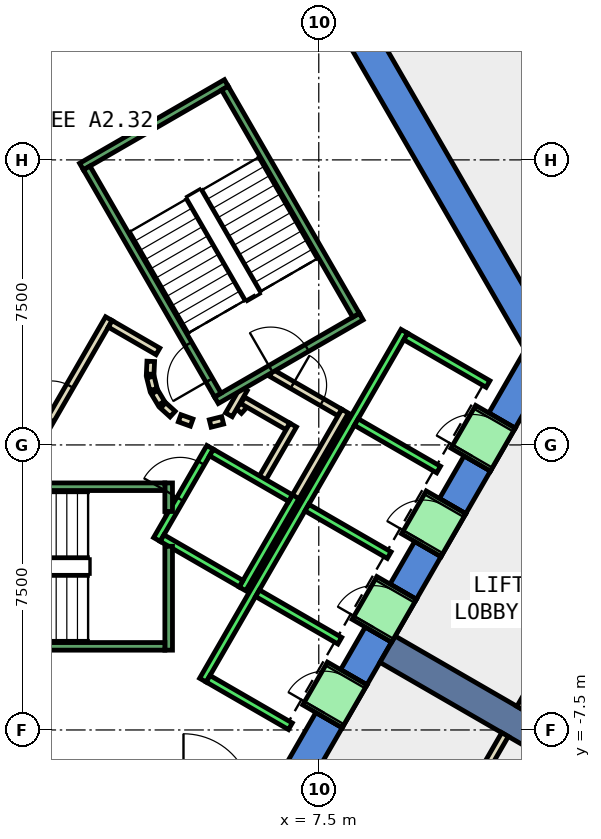
"""IFC4 building model, lengths in metres.
Left out: names, types, materials, properties, quantities, classifications, styles, units other than length and angle.
Written with IfcOpenShell. Run it as: python <this file> out.ifc"""

import sys

from ifc_helpers import new_model, si_unit, direction, frame, frame_2d, origin, place, context, subcontext, project, spatial, polyline, rectangle, outline, extrude, element, fill, save


model = new_model("IFC4")
c1 = context("Model", 3, precision=1e-05, world=origin(), true_north=direction((0.0, 1.0)))
c2 = subcontext(c1, "Body", "Model", "MODEL_VIEW")
j1 = project(units=[si_unit("LENGTHUNIT", "METRE"), si_unit("PLANEANGLEUNIT", "RADIAN")], contexts=[c1])
p1 = place(None, origin())
s1 = spatial("IfcSite", under=j1, at=p1, CompositionType="ELEMENT")
p2 = place(p1, origin())
s2 = spatial("IfcBuilding", under=s1, at=p2, CompositionType="ELEMENT")
p3 = place(p2, frame((0.0, 0.0, 159.2)))
s3 = spatial("IfcBuildingStorey", under=s2, at=p3, CompositionType="ELEMENT", Elevation=159.2)
p4 = place(p3, frame((0.0, 0.0, -0.4)))
e1 = element("IfcWall", 1, at=p4, inside=s3, PredefinedType="SHEAR", context=c2, shape_type="SweptSolid", body=[
    extrude(outline(polyline([(8.517, 11.748), (7.824, 11.348), (12.933, 2.5), (13.856, 2.5), (8.517, 11.748)])), origin(), (0.0, 0.0, 1.0), 4.2),
])
p5 = place(p3, frame((0.0, 0.0, -0.4)))
e2 = element("IfcWall", 2, at=p5, inside=s3, PredefinedType="SHEAR", context=c2, shape_type="SweptSolid", body=[
    extrude(outline(polyline([(8.117, -7.44), (7.424, -7.04), (6.466, -8.7), (6.928, -9.5), (8.117, -7.44)])), origin(), (0.0, 0.0, 1.0), 4.2),
])
p6 = place(p3, frame((0.0, 0.0, -0.4)))
e3 = element("IfcWall", 3, at=p6, inside=s3, PredefinedType="SHEAR", context=c2, shape_type="SweptSolid", body=[
    extrude(outline(polyline([(9.417, -5.189), (8.724, -4.789), (8.075, -5.914), (8.767, -6.314), (9.417, -5.189)])), origin(), (0.0, 0.0, 1.0), 4.2),
])
p7 = place(p3, frame((0.0, 0.0, -0.4)))
e4 = element("IfcWall", 4, at=p7, inside=s3, PredefinedType="SHEAR", context=c2, shape_type="SweptSolid", body=[
    extrude(outline(polyline([(10.717, -2.937), (10.025, -2.537), (9.374, -3.663), (10.067, -4.063), (10.717, -2.937)])), origin(), (0.0, 0.0, 1.0), 4.2),
])
p8 = place(p3, frame((0.0, 0.0, -0.4)))
e5 = element("IfcWall", 5, at=p8, inside=s3, PredefinedType="SHEAR", context=c2, shape_type="SweptSolid", body=[
    extrude(outline(polyline([(12.017, -0.686), (11.324, -0.286), (10.675, -1.411), (11.367, -1.811), (12.017, -0.686)])), origin(), (0.0, 0.0, 1.0), 4.2),
])
p9 = place(p3, frame((0.0, 0.0, -0.4)))
e6 = element("IfcWall", 6, at=p9, inside=s3, PredefinedType="SHEAR", context=c2, shape_type="SweptSolid", body=[
    extrude(outline(polyline([(11.974, 0.84), (12.667, 0.44), (13.856, 2.5), (12.933, 2.5), (11.974, 0.84)])), origin(), (0.0, 0.0, 1.0), 4.2),
])
p10 = place(p3, frame((0.0, 0.0, 3.6)))
e7 = element("IfcWall", 7, at=p10, inside=s3, PredefinedType="SHEAR", context=c2, shape_type="SweptSolid", body=[
    extrude(outline(polyline([(8.767, -6.314), (8.075, -5.914), (7.424, -7.04), (8.117, -7.44), (8.767, -6.314)])), origin(), (0.0, 0.0, 1.0), 0.2),
])
p11 = place(p3, frame((0.0, 0.0, 3.6)))
e8 = element("IfcWall", 8, at=p11, inside=s3, PredefinedType="SHEAR", context=c2, shape_type="SweptSolid", body=[
    extrude(outline(polyline([(10.067, -4.063), (9.374, -3.663), (8.724, -4.789), (9.417, -5.189), (10.067, -4.063)])), origin(), (0.0, 0.0, 1.0), 0.2),
])
p12 = place(p3, frame((0.0, 0.0, 3.6)))
e9 = element("IfcWall", 9, at=p12, inside=s3, PredefinedType="SHEAR", context=c2, shape_type="SweptSolid", body=[
    extrude(outline(polyline([(11.367, -1.811), (10.675, -1.411), (10.025, -2.537), (10.717, -2.937), (11.367, -1.811)])), origin(), (0.0, 0.0, 1.0), 0.2),
])
p13 = place(p3, frame((0.0, 0.0, 3.6)))
e10 = element("IfcWall", 10, at=p13, inside=s3, PredefinedType="SHEAR", context=c2, shape_type="SweptSolid", body=[
    extrude(outline(polyline([(12.667, 0.44), (11.974, 0.84), (11.324, -0.286), (12.017, -0.686), (12.667, 0.44)])), origin(), (0.0, 0.0, 1.0), 0.2),
])
p14 = place(p3, frame((9.31, -5.375, -0.4), z_axis=(0.0, 0.0, 1.0), x_axis=(0.866017533419, -0.500013631625, 0.0)))
e11 = element("IfcWall", 11, at=p14, inside=s3, PredefinedType="SHEAR", context=c2, shape_type="SweptSolid", body=[
    extrude(rectangle(XDim=9.0, YDim=0.8, at=frame_2d((4.5, 0.0))), origin(), (0.0, 0.0, 1.0), 4.2),
])
p15 = place(p3, frame((5.39, 0.898, 0.0), z_axis=(0.0, 0.0, 1.0), x_axis=(0.673828488714, 0.738887791073, 0.0)))
e12 = element("IfcWall", 12, at=p15, inside=s3, PredefinedType="PARTITIONING", context=c2, shape_type="SweptSolid", body=[
    extrude(rectangle(XDim=0.263, YDim=0.2, at=frame_2d((0.131, 0.0))), origin(), (0.0, 0.0, 1.0), 3.8),
])
p16 = place(p3, frame((5.499, 1.172, 0.0), z_axis=(0.0, 0.0, 1.0), x_axis=(0.866333505267, -0.499465972466, 0.0)))
e13 = element("IfcWall", 13, at=p16, inside=s3, PredefinedType="PARTITIONING", context=c2, shape_type="SweptSolid", body=[
    extrude(rectangle(XDim=1.374, YDim=0.2, at=frame_2d((0.687, 0.0))), origin(), (0.0, 0.0, 1.0), 3.8),
])
p17 = place(p3, frame((6.826, 0.522, 0.0), z_axis=(0.0, 0.0, 1.0), x_axis=(-0.500016722714, -0.866015748706, 0.0)))
e14 = element("IfcWall", 14, at=p17, inside=s3, PredefinedType="PARTITIONING", context=c2, shape_type="SweptSolid", body=[
    extrude(rectangle(XDim=1.7, YDim=0.2, at=frame_2d((0.85, 0.0))), origin(), (0.0, 0.0, 1.0), 3.8),
])
p18 = place(p3, frame((6.25, 1.894, 0.0), z_axis=(0.0, 0.0, 1.0), x_axis=(0.866043184279, -0.499969202016, 0.0)))
e15 = element("IfcWall", 15, at=p18, inside=s3, PredefinedType="PARTITIONING", context=c2, shape_type="SweptSolid", body=[
    extrude(rectangle(XDim=2.084, YDim=0.2, at=frame_2d((1.042, 0.0))), origin(), (0.0, 0.0, 1.0), 3.8),
])
p19 = place(p18, frame((0.642, 0.0, 0.0)))
e16 = element("IfcOpeningElement", 16, at=p19, cuts=e15, PredefinedType="OPENING", context=c2, shape_type="SweptSolid", body=[
    extrude(rectangle(XDim=0.9, YDim=2.1, at=frame_2d((0.45, 1.05))), frame((0.0, 0.11, 0.0), z_axis=(0.0, -1.0, 0.0), x_axis=(1.0, 0.0, 0.0)), (0.0, 0.0, 1.0), 0.22),
])
p20 = place(p3, frame((8.192, 0.888, 0.0), z_axis=(0.0, 0.0, 1.0), x_axis=(-0.499940625693, -0.866059680843, 0.0)))
e17 = element("IfcWall", 17, at=p20, inside=s3, PredefinedType="PARTITIONING", context=c2, shape_type="SweptSolid", body=[
    extrude(rectangle(XDim=2.68, YDim=0.2, at=frame_2d((1.34, 0.0))), origin(), (0.0, 0.0, 1.0), 3.8),
])
p21 = place(p3, frame((5.135, 0.793, 0.0), z_axis=(0.0, 0.0, 1.0), x_axis=(0.499526442893, 0.866298639529, 0.0)))
e18 = element("IfcWall", 18, at=p21, inside=s3, PredefinedType="PARTITIONING", context=c2, shape_type="SweptSolid", body=[
    extrude(rectangle(XDim=0.791, YDim=0.2, at=frame_2d((0.396, 0.0))), origin(), (0.0, 0.0, 1.0), 3.8),
])
p22 = place(p3, frame((-0.52, -1.0, 0.0), z_axis=(0.0, 0.0, 1.0), x_axis=(0.50011622646, 0.865958290007, 0.0)))
e19 = element("IfcWall", 19, at=p22, inside=s3, PredefinedType="PARTITIONING", context=c2, shape_type="SweptSolid", body=[
    extrude(rectangle(XDim=4.991, YDim=0.2, at=frame_2d((2.496, 0.0))), origin(), (0.0, 0.0, 1.0), 3.8),
])
p23 = place(p22, frame((1.945, 0.0, 0.0)))
e20 = element("IfcOpeningElement", 20, at=p23, cuts=e19, PredefinedType="OPENING", context=c2, shape_type="SweptSolid", body=[
    extrude(rectangle(XDim=1.0, YDim=2.1, at=frame_2d((0.5, 1.05))), frame((0.0, 0.11, 0.0), z_axis=(0.0, -1.0, 0.0), x_axis=(1.0, 0.0, 0.0)), (0.0, 0.0, 1.0), 0.22),
])
p24 = place(p3, frame((2.012, 3.186, 0.0), z_axis=(0.0, 0.0, 1.0), x_axis=(0.865891012941, -0.500232699559, 0.0)))
e21 = element("IfcWall", 21, at=p24, inside=s3, PredefinedType="PARTITIONING", context=c2, shape_type="SweptSolid", body=[
    extrude(rectangle(XDim=1.449, YDim=0.2, at=frame_2d((0.725, 0.0))), origin(), (0.0, 0.0, 1.0), 3.8),
])
p25 = place(p3, frame((3.079, 2.199, 0.0), z_axis=(0.0, 0.0, 1.0), x_axis=(-0.047771483479, -0.998858290933, 0.0)))
e22 = element("IfcWall", 22, at=p25, inside=s3, PredefinedType="PARTITIONING", context=c2, shape_type="SweptSolid", body=[
    extrude(rectangle(XDim=0.337, YDim=0.2, at=frame_2d((0.169, 0.0))), origin(), (0.0, 0.0, 1.0), 3.8),
])
p26 = place(p3, frame((3.07, 1.786, 0.0), z_axis=(0.0, 0.0, 1.0), x_axis=(0.242705583207, -0.970099994784, 0.0)))
e23 = element("IfcWall", 23, at=p26, inside=s3, PredefinedType="PARTITIONING", context=c2, shape_type="SweptSolid", body=[
    extrude(rectangle(XDim=0.338, YDim=0.2, at=frame_2d((0.169, 0.0))), origin(), (0.0, 0.0, 1.0), 3.8),
])
for number, where, z_axis, x_axis in (
    (24, (3.182, 1.388, 0.0), (0.0, 0.0, 1.0), (0.512, -0.859, 0.0)),
    (25, (3.404, 1.039, 0.0), (0.0, 0.0, 1.0), (0.74, -0.672, 0.0)),
):
    element("IfcWall", number, at=place(p3, frame(where, z_axis=z_axis, x_axis=x_axis)), inside=s3, PredefinedType="PARTITIONING", context=c2, shape_type="SweptSolid", body=[
        extrude(rectangle(XDim=0.338, YDim=0.2, at=frame_2d((0.169, 0.0))), origin(), (0.0, 0.0, 1.0), 3.8),
    ])
p27 = place(p3, frame((3.838, 0.702, 0.0), z_axis=(0.0, 0.0, 1.0), x_axis=(0.941035081519, -0.338308993895, 0.0)))
e26 = element("IfcWall", 26, at=p27, inside=s3, PredefinedType="PARTITIONING", context=c2, shape_type="SweptSolid", body=[
    extrude(rectangle(XDim=0.337, YDim=0.2, at=frame_2d((0.168, 0.0))), origin(), (0.0, 0.0, 1.0), 3.8),
])
p28 = place(p3, frame((4.644, 0.564, 0.0), z_axis=(0.0, 0.0, 1.0), x_axis=(0.969929076366, 0.243387729394, 0.0)))
e27 = element("IfcWall", 27, at=p28, inside=s3, PredefinedType="PARTITIONING", context=c2, shape_type="SweptSolid", body=[
    extrude(rectangle(XDim=0.337, YDim=0.2, at=frame_2d((0.168, 0.0))), origin(), (0.0, 0.0, 1.0), 3.8),
])
p29 = place(p3, frame((17.621, 1.42, 0.0), z_axis=(0.0, 0.0, 1.0), x_axis=(-0.499987708133, -0.866032500381, 0.0)))
e28 = element("IfcWall", 28, at=p29, inside=s3, PredefinedType="PARTITIONING", context=c2, shape_type="SweptSolid", body=[
    extrude(rectangle(XDim=9.64, YDim=0.2, at=frame_2d((4.82, 0.0))), origin(), (0.0, 0.0, 1.0), 3.8),
])
p30 = place(p3, frame((12.401, -7.621, 0.0), z_axis=(0.0, 0.0, 1.0), x_axis=(-0.499983724212, -0.866034800411, 0.0)))
e29 = element("IfcWall", 29, at=p30, inside=s3, PredefinedType="PARTITIONING", context=c2, shape_type="SweptSolid", body=[
    extrude(rectangle(XDim=9.302, YDim=0.2, at=frame_2d((4.651, 0.0))), origin(), (0.0, 0.0, 1.0), 3.8),
])
p31 = place(p3, frame((3.24, -2.488, 0.0), z_axis=(0.0, 0.0, 1.0), x_axis=(0.49994636267, 0.866056369097, 0.0)))
e30 = element("IfcWall", 30, at=p31, inside=s3, PredefinedType="STANDARD", context=c2, shape_type="SweptSolid", body=[
    extrude(rectangle(XDim=2.8, YDim=0.2, at=frame_2d((1.4, 0.0))), origin(), (0.0, 0.0, 1.0), 3.8),
])
p32 = place(p31, frame((1.225, 0.0, 0.0)))
e31 = element("IfcOpeningElement", 31, at=p32, cuts=e30, PredefinedType="OPENING", context=c2, shape_type="SweptSolid", body=[
    extrude(rectangle(XDim=1.1, YDim=2.1, at=frame_2d((0.55, 1.05))), frame((0.0, 0.11, 0.0), z_axis=(0.0, -1.0, 0.0), x_axis=(1.0, 0.0, 0.0)), (0.0, 0.0, 1.0), 0.22),
])
p33 = place(p3, frame((5.492, -3.788, 0.0), z_axis=(0.0, 0.0, 1.0), x_axis=(0.500011755427, 0.866018616679, 0.0)))
e32 = element("IfcWall", 32, at=p33, inside=s3, PredefinedType="STANDARD", context=c2, shape_type="SweptSolid", body=[
    extrude(rectangle(XDim=2.8, YDim=0.2, at=frame_2d((1.4, 0.0))), origin(), (0.0, 0.0, 1.0), 3.8),
])
p34 = place(p3, frame((3.377, -2.452, 0.0), z_axis=(0.0, 0.0, 1.0), x_axis=(0.865955154139, -0.50012165622, 0.0)))
e33 = element("IfcWall", 33, at=p34, inside=s3, PredefinedType="STANDARD", context=c2, shape_type="SweptSolid", body=[
    extrude(rectangle(XDim=2.4, YDim=0.2, at=frame_2d((1.2, 0.0))), origin(), (0.0, 0.0, 1.0), 3.8),
])
p35 = place(p3, frame((4.677, -0.2, 0.0), z_axis=(0.0, 0.0, 1.0), x_axis=(0.865973769406, -0.500089422704, 0.0)))
e34 = element("IfcWall", 34, at=p35, inside=s3, PredefinedType="STANDARD", context=c2, shape_type="SweptSolid", body=[
    extrude(rectangle(XDim=2.399, YDim=0.2, at=frame_2d((1.2, 0.0))), origin(), (0.0, 0.0, 1.0), 3.8),
])
p36 = place(p3, frame((4.451, -6.19, 0.0), z_axis=(0.0, 0.0, 1.0), x_axis=(0.50000090737, 0.866024879913, 0.0)))
e35 = element("IfcWall", 35, at=p36, inside=s3, PredefinedType="STANDARD", context=c2, shape_type="SweptSolid", body=[
    extrude(rectangle(XDim=10.6, YDim=0.2, at=frame_2d((5.3, 0.0))), origin(), (0.0, 0.0, 1.0), 3.8),
])
for number, where, z_axis, x_axis in (
    (36, (4.588, -6.153, 0.0), (0.0, 0.0, 1.0), (0.866, -0.5, 0.0)),
    (37, (5.888, -3.902, 0.0), (0.0, 0.0, 1.0), (0.866, -0.5, 0.0)),
    (38, (7.188, -1.65, 0.0), (0.0, 0.0, 1.0), (0.866, -0.5, 0.0)),
    (39, (8.488, 0.602, 0.0), (0.0, 0.0, 1.0), (0.866, -0.5, 0.0)),
):
    element("IfcWall", number, at=place(p3, frame(where, z_axis=z_axis, x_axis=x_axis)), inside=s3, PredefinedType="STANDARD", context=c2, shape_type="SweptSolid", body=[
        extrude(rectangle(XDim=2.5, YDim=0.2, at=frame_2d((1.25, 0.0))), origin(), (0.0, 0.0, 1.0), 3.8),
    ])
p37 = place(p3, frame((9.788, 2.853, 0.0), z_axis=(0.0, 0.0, 1.0), x_axis=(0.865998541277, -0.500046524342, 0.0)))
e40 = element("IfcWall", 40, at=p37, inside=s3, PredefinedType="STANDARD", context=c2, shape_type="SweptSolid", body=[
    extrude(rectangle(XDim=2.5, YDim=0.2, at=frame_2d((1.25, 0.0))), origin(), (0.0, 0.0, 1.0), 3.8),
])
p38 = place(p3, frame((7.598, -7.14, 0.0), z_axis=(0.0, 0.0, 1.0), x_axis=(0.500362116554, 0.865816234728, 0.0)))
e41 = element("IfcWall", 41, at=p38, inside=s3, PredefinedType="STANDARD", context=c2, shape_type="SweptSolid", body=[
    extrude(rectangle(XDim=1.299, YDim=1.2, at=frame_2d((0.65, 0.0))), origin(), (0.0, 0.0, 1.0), 2.4),
])
p39 = place(p38, frame((0.1, 0.0, 0.0)))
e42 = element("IfcOpeningElement", 42, at=p39, cuts=e41, PredefinedType="OPENING", context=c2, shape_type="SweptSolid", body=[
    extrude(rectangle(XDim=1.1, YDim=2.3, at=frame_2d((0.55, 1.15))), frame((0.0, 0.61, 0.0), z_axis=(0.0, -1.0, 0.0), x_axis=(1.0, 0.0, 0.0)), (0.0, 0.0, 1.0), 1.22),
])
p40 = place(p3, frame((8.898, -4.889, 0.0), z_axis=(0.0, 0.0, 1.0), x_axis=(0.500036693733, 0.866004217611, 0.0)))
e43 = element("IfcWall", 43, at=p40, inside=s3, PredefinedType="STANDARD", context=c2, shape_type="SweptSolid", body=[
    extrude(rectangle(XDim=1.3, YDim=1.2, at=frame_2d((0.65, 0.0))), origin(), (0.0, 0.0, 1.0), 2.4),
])
p41 = place(p40, frame((0.1, 0.0, 0.0)))
e44 = element("IfcOpeningElement", 44, at=p41, cuts=e43, PredefinedType="OPENING", context=c2, shape_type="SweptSolid", body=[
    extrude(rectangle(XDim=1.1, YDim=2.3, at=frame_2d((0.55, 1.15))), frame((0.0, 0.61, 0.0), z_axis=(0.0, -1.0, 0.0), x_axis=(1.0, 0.0, 0.0)), (0.0, 0.0, 1.0), 1.22),
])
p42 = place(p3, frame((10.198, -2.637, 0.0), z_axis=(0.0, 0.0, 1.0), x_axis=(0.49989585183, 0.866085525409, 0.0)))
e45 = element("IfcWall", 45, at=p42, inside=s3, PredefinedType="STANDARD", context=c2, shape_type="SweptSolid", body=[
    extrude(rectangle(XDim=1.3, YDim=1.2, at=frame_2d((0.65, 0.0))), origin(), (0.0, 0.0, 1.0), 2.4),
])
p43 = place(p42, frame((0.1, 0.0, 0.0)))
e46 = element("IfcOpeningElement", 46, at=p43, cuts=e45, PredefinedType="OPENING", context=c2, shape_type="SweptSolid", body=[
    extrude(rectangle(XDim=1.1, YDim=2.3, at=frame_2d((0.55, 1.15))), frame((0.0, 0.61, 0.0), z_axis=(0.0, -1.0, 0.0), x_axis=(1.0, 0.0, 0.0)), (0.0, 0.0, 1.0), 1.22),
])
p44 = place(p3, frame((11.498, -0.385, 0.0), z_axis=(0.0, 0.0, 1.0), x_axis=(0.500221244143, 0.865897630733, 0.0)))
e47 = element("IfcWall", 47, at=p44, inside=s3, PredefinedType="STANDARD", context=c2, shape_type="SweptSolid", body=[
    extrude(rectangle(XDim=1.299, YDim=1.2, at=frame_2d((0.65, 0.0))), origin(), (0.0, 0.0, 1.0), 2.4),
])
p45 = place(p44, frame((0.1, 0.0, 0.0)))
e48 = element("IfcOpeningElement", 48, at=p45, cuts=e47, PredefinedType="OPENING", context=c2, shape_type="SweptSolid", body=[
    extrude(rectangle(XDim=1.1, YDim=2.3, at=frame_2d((0.55, 1.15))), frame((0.0, 0.61, 0.0), z_axis=(0.0, -1.0, 0.0), x_axis=(1.0, 0.0, 0.0)), (0.0, 0.0, 1.0), 1.22),
])
p46 = place(p3, frame((3.55, -2.667, 0.0), z_axis=(0.0, 0.0, 1.0), x_axis=(0.0, -1.0, 0.0)))
e49 = element("IfcWall", 49, at=p46, inside=s3, PredefinedType="STANDARD", context=c2, shape_type="SweptSolid", body=[
    extrude(rectangle(XDim=2.733, YDim=0.2, at=frame_2d((1.366, 0.0))), origin(), (0.0, 0.0, 1.0), 3.8),
])
p47 = place(p3, frame((3.55, -1.0, 0.0), z_axis=(0.0, 0.0, 1.0), x_axis=(0.0, -1.0, 0.0)))
e50 = element("IfcWall", 50, at=p47, inside=s3, PredefinedType="STANDARD", context=c2, shape_type="SweptSolid", body=[
    extrude(rectangle(XDim=0.751, YDim=0.2, at=frame_2d((0.375, 0.0))), origin(), (0.0, 0.0, 1.0), 3.8),
])
p48 = place(p3, frame((-3.45, -1.1, 0.0), z_axis=(0.0, 0.0, 1.0), x_axis=(1.0, 0.0, 0.0)))
e51 = element("IfcWall", 51, at=p48, inside=s3, PredefinedType="STANDARD", context=c2, shape_type="SweptSolid", body=[
    extrude(rectangle(XDim=6.9, YDim=0.2, at=frame_2d((3.45, 0.0))), origin(), (0.0, 0.0, 1.0), 3.8),
])
p49 = place(p48, frame((0.45, 0.0, 0.0)))
e52 = element("IfcOpeningElement", 52, at=p49, cuts=e51, PredefinedType="OPENING", context=c2, shape_type="SweptSolid", body=[
    extrude(rectangle(XDim=1.1, YDim=2.2, at=frame_2d((0.55, 1.1))), frame((0.0, 0.11, 0.0), z_axis=(0.0, -1.0, 0.0), x_axis=(1.0, 0.0, 0.0)), (0.0, 0.0, 1.0), 0.22),
])
p50 = place(p3, frame((-3.45, -5.3, 0.0), z_axis=(0.0, 0.0, 1.0), x_axis=(1.0, 0.0, 0.0)))
e53 = element("IfcWall", 53, at=p50, inside=s3, PredefinedType="STANDARD", context=c2, shape_type="SweptSolid", body=[
    extrude(rectangle(XDim=6.9, YDim=0.2, at=frame_2d((3.45, 0.0))), origin(), (0.0, 0.0, 1.0), 3.8),
])
p51 = place(p3, frame((4.806, 1.176, 0.0), z_axis=(0.0, 0.0, 1.0), x_axis=(0.866059941101, 0.499940174841, 0.0)))
e54 = element("IfcWall", 54, at=p51, inside=s3, PredefinedType="STANDARD", context=c2, shape_type="SweptSolid", body=[
    extrude(rectangle(XDim=4.4, YDim=0.2, at=frame_2d((2.2, 0.0))), origin(), (0.0, 0.0, 1.0), 3.8),
])
p52 = place(p51, frame((1.65, 0.0, 0.0)))
e55 = element("IfcOpeningElement", 55, at=p52, cuts=e54, PredefinedType="OPENING", context=c2, shape_type="SweptSolid", body=[
    extrude(rectangle(XDim=1.1, YDim=2.2, at=frame_2d((0.55, 1.1))), frame((0.0, 0.11, 0.0), z_axis=(0.0, -1.0, 0.0), x_axis=(1.0, 0.0, 0.0)), (0.0, 0.0, 1.0), 0.22),
])
p53 = place(p3, frame((1.256, 7.324, 0.0), z_axis=(0.0, 0.0, 1.0), x_axis=(0.866046073146, 0.499964197906, 0.0)))
e56 = element("IfcWall", 56, at=p53, inside=s3, PredefinedType="STANDARD", context=c2, shape_type="SweptSolid", body=[
    extrude(rectangle(XDim=4.4, YDim=0.2, at=frame_2d((2.2, 0.0))), origin(), (0.0, 0.0, 1.0), 3.8),
])
p54 = place(p3, frame((4.843, 1.312, 0.0), z_axis=(0.0, 0.0, 1.0), x_axis=(-0.499963383562, 0.866046543262, 0.0)))
e57 = element("IfcWall", 57, at=p54, inside=s3, PredefinedType="STANDARD", context=c2, shape_type="SweptSolid", body=[
    extrude(rectangle(XDim=6.9, YDim=0.2, at=frame_2d((3.45, 0.0))), origin(), (0.0, 0.0, 1.0), 3.8),
])
p55 = place(p54, frame((0.45, 0.0, 0.0)))
e58 = element("IfcOpeningElement", 58, at=p55, cuts=e57, PredefinedType="OPENING", context=c2, shape_type="SweptSolid", body=[
    extrude(rectangle(XDim=1.1, YDim=2.2, at=frame_2d((0.55, 1.1))), frame((0.0, 0.11, 0.0), z_axis=(0.0, -1.0, 0.0), x_axis=(1.0, 0.0, 0.0)), (0.0, 0.0, 1.0), 0.22),
])
p56 = place(p3, frame((8.48, 3.412, 0.0), z_axis=(0.0, 0.0, 1.0), x_axis=(-0.499978703459, 0.866037698999, 0.0)))
e59 = element("IfcWall", 59, at=p56, inside=s3, PredefinedType="STANDARD", context=c2, shape_type="SweptSolid", body=[
    extrude(rectangle(XDim=6.9, YDim=0.2, at=frame_2d((3.45, 0.0))), origin(), (0.0, 0.0, 1.0), 3.8),
])
p57 = place(p23, origin())
e60 = element("IfcDoor", 60, at=p57, inside=s3, OperationType="SINGLE_SWING_LEFT", PredefinedType="DOOR", context=c2, shape_type="SweptSolid", body=[
    extrude(rectangle(XDim=1.0, YDim=2.1, at=frame_2d((0.5, 1.05))), frame((0.0, 0.025, 0.0), z_axis=(0.0, -1.0, 0.0), x_axis=(1.0, 0.0, 0.0)), (0.0, 0.0, 1.0), 0.05),
])
fill(e20, e60)
p58 = place(p19, origin())
e61 = element("IfcDoor", 61, at=p58, inside=s3, OperationType="SINGLE_SWING_LEFT", PredefinedType="DOOR", context=c2, shape_type="SweptSolid", body=[
    extrude(rectangle(XDim=0.9, YDim=2.1, at=frame_2d((0.45, 1.05))), frame((0.0, 0.025, 0.0), z_axis=(0.0, -1.0, 0.0), x_axis=(1.0, 0.0, 0.0)), (0.0, 0.0, 1.0), 0.05),
])
fill(e16, e61)
p59 = place(p39, origin())
e62 = element("IfcDoor", 62, at=p59, inside=s3, OperationType="SLIDING_TO_LEFT", PredefinedType="DOOR", context=c2, shape_type="SweptSolid", body=[
    extrude(rectangle(XDim=1.1, YDim=2.3, at=frame_2d((0.55, 1.15))), frame((0.0, 0.025, 0.0), z_axis=(0.0, -1.0, 0.0), x_axis=(1.0, 0.0, 0.0)), (0.0, 0.0, 1.0), 0.05),
])
fill(e42, e62)
p60 = place(p41, origin())
e63 = element("IfcDoor", 63, at=p60, inside=s3, OperationType="SLIDING_TO_LEFT", PredefinedType="DOOR", context=c2, shape_type="SweptSolid", body=[
    extrude(rectangle(XDim=1.1, YDim=2.3, at=frame_2d((0.55, 1.15))), frame((0.0, 0.025, 0.0), z_axis=(0.0, -1.0, 0.0), x_axis=(1.0, 0.0, 0.0)), (0.0, 0.0, 1.0), 0.05),
])
fill(e44, e63)
p61 = place(p43, origin())
e64 = element("IfcDoor", 64, at=p61, inside=s3, OperationType="SLIDING_TO_LEFT", PredefinedType="DOOR", context=c2, shape_type="SweptSolid", body=[
    extrude(rectangle(XDim=1.1, YDim=2.3, at=frame_2d((0.55, 1.15))), frame((0.0, 0.025, 0.0), z_axis=(0.0, -1.0, 0.0), x_axis=(1.0, 0.0, 0.0)), (0.0, 0.0, 1.0), 0.05),
])
fill(e46, e64)
p62 = place(p45, origin())
e65 = element("IfcDoor", 65, at=p62, inside=s3, OperationType="SLIDING_TO_LEFT", PredefinedType="DOOR", context=c2, shape_type="SweptSolid", body=[
    extrude(rectangle(XDim=1.1, YDim=2.3, at=frame_2d((0.55, 1.15))), frame((0.0, 0.025, 0.0), z_axis=(0.0, -1.0, 0.0), x_axis=(1.0, 0.0, 0.0)), (0.0, 0.0, 1.0), 0.05),
])
fill(e48, e65)
p63 = place(p32, origin())
e66 = element("IfcDoor", 66, at=p63, inside=s3, OperationType="SLIDING_TO_LEFT", PredefinedType="DOOR", context=c2, shape_type="SweptSolid", body=[
    extrude(rectangle(XDim=1.1, YDim=2.1, at=frame_2d((0.55, 1.05))), frame((0.0, 0.025, 0.0), z_axis=(0.0, -1.0, 0.0), x_axis=(1.0, 0.0, 0.0)), (0.0, 0.0, 1.0), 0.05),
])
fill(e31, e66)
p64 = place(p55, origin())
e67 = element("IfcDoor", 67, at=p64, inside=s3, OperationType="SINGLE_SWING_LEFT", PredefinedType="DOOR", context=c2, shape_type="SweptSolid", body=[
    extrude(rectangle(XDim=1.1, YDim=2.2, at=frame_2d((0.55, 1.1))), frame((0.0, 0.025, 0.0), z_axis=(0.0, -1.0, 0.0), x_axis=(1.0, 0.0, 0.0)), (0.0, 0.0, 1.0), 0.05),
])
fill(e58, e67)
p65 = place(p52, origin())
e68 = element("IfcDoor", 68, at=p65, inside=s3, OperationType="SINGLE_SWING_LEFT", PredefinedType="DOOR", context=c2, shape_type="SweptSolid", body=[
    extrude(rectangle(XDim=1.1, YDim=2.2, at=frame_2d((0.55, 1.1))), frame((0.0, 0.025, 0.0), z_axis=(0.0, -1.0, 0.0), x_axis=(1.0, 0.0, 0.0)), (0.0, 0.0, 1.0), 0.05),
])
fill(e55, e68)
save(model, sys.argv[1])
